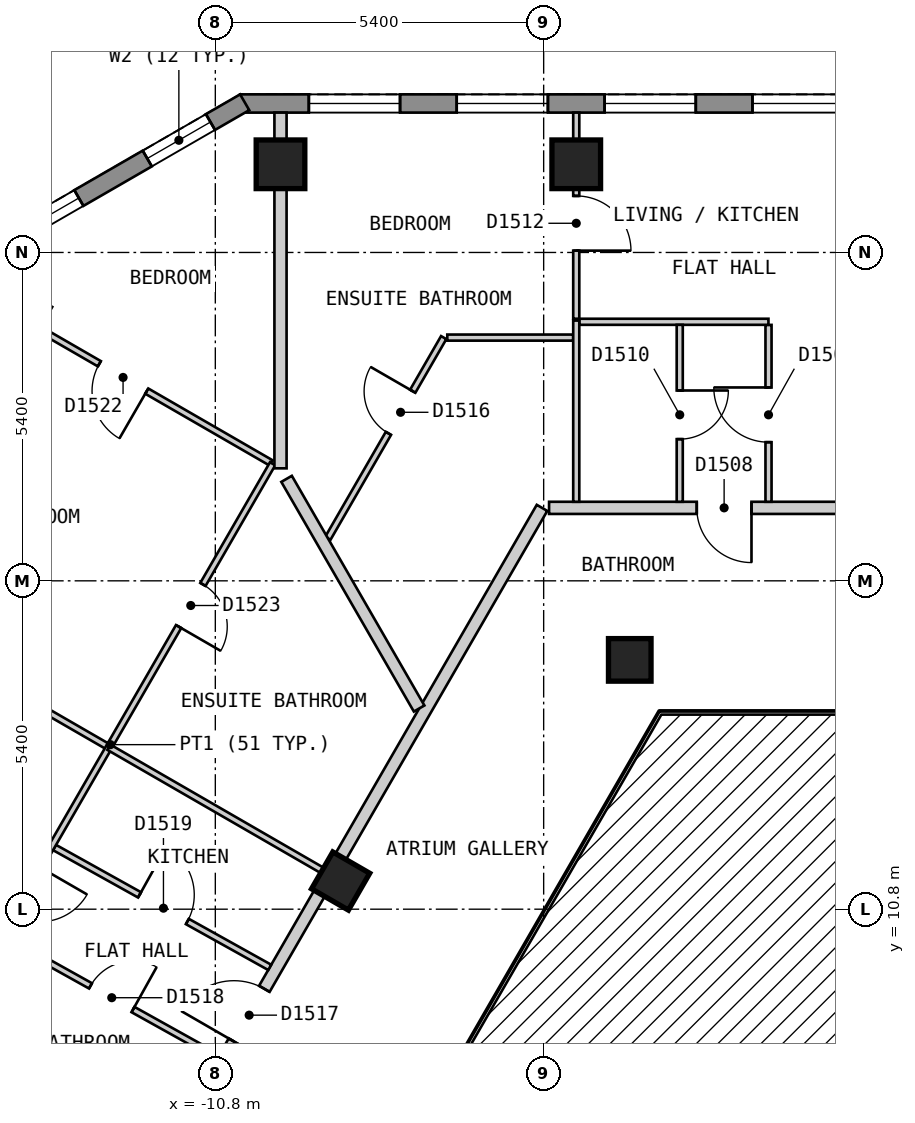
"""IFC4 building model, lengths in metres.
Left out: names, types, materials, properties, quantities, classifications, styles, units other than length and angle.
Written with IfcOpenShell. Run it as: python <this file> out.ifc"""

import sys

from ifc_helpers import new_model, si_unit, direction, frame, frame_2d, origin, origin_2d, place, context, subcontext, project, spatial, polyline, rectangle, outline, extrude, element, fill, save


model = new_model("IFC4")
c1 = context("Model", 3, precision=1e-05, world=origin(), true_north=direction((0.0, 1.0)))
c2 = subcontext(c1, "Body", "Model", "MODEL_VIEW")
j1 = project(units=[si_unit("LENGTHUNIT", "METRE"), si_unit("PLANEANGLEUNIT", "RADIAN")], contexts=[c1])
p1 = place(None, origin())
s1 = spatial("IfcSite", under=j1, at=p1, CompositionType="ELEMENT")
p2 = place(p1, origin())
s2 = spatial("IfcBuilding", under=s1, at=p2, CompositionType="ELEMENT")
p3 = place(p2, frame((0.0, 0.0, 184.2)))
s3 = spatial("IfcBuildingStorey", under=s2, at=p3, CompositionType="ELEMENT", Elevation=184.2)
for number, where, z_axis, x_axis in (
    (1, (-4.864, 23.05, 0.0), (0.0, 0.0, 1.0), (-1.0, 0.0, 0.0)),
    (2, (-9.728, 23.05, 0.0), (0.0, 0.0, 1.0), (-1.0, 0.0, 0.0)),
):
    element("IfcColumn", number, at=place(p3, frame(where, z_axis=z_axis, x_axis=x_axis)), inside=s3, PredefinedType="COLUMN", context=c2, shape_type="SweptSolid", body=[
        extrude(rectangle(XDim=0.8, YDim=0.8, at=origin_2d()), origin(), (0.0, 0.0, 1.0), 3.0),
    ])
for number, where, z_axis, x_axis in (
    (3, (-3.984, 14.9, 0.0), (0.0, 0.0, 1.0), (1.0, 0.0, 0.0)),
    (4, (-8.739, 11.263, 0.0), (0.0, 0.0, 1.0), (-0.5, -0.866, 0.0)),
):
    element("IfcColumn", number, at=place(p3, frame(where, z_axis=z_axis, x_axis=x_axis)), inside=s3, PredefinedType="COLUMN", context=c2, shape_type="SweptSolid", body=[
        extrude(rectangle(XDim=0.7, YDim=0.7, at=origin_2d()), origin(), (0.0, 0.0, 1.0), 3.0),
    ])
p4 = place(p3, frame((10.392, 24.05, 0.0), z_axis=(0.0, 0.0, 1.0), x_axis=(-1.0, 0.0, 0.0)))
e5 = element("IfcWall", 5, at=p4, inside=s3, PredefinedType="SOLIDWALL", context=c2, shape_type="SweptSolid", body=[
    extrude(outline(polyline([(0.0, -0.15), (20.784, -0.15), (20.704, 0.15), (0.08, 0.15), (0.0, -0.15)])), origin(), (0.0, 0.0, 1.0), 2.7),
])
p5 = place(p4, frame((1.13, 0.0, 0.15)))
e6 = element("IfcOpeningElement", 6, at=p5, cuts=e5, PredefinedType="OPENING", context=c2, shape_type="SweptSolid", body=[
    extrude(rectangle(XDim=1.5, YDim=2.1, at=frame_2d((0.75, 1.05))), frame((0.0, 0.16, 0.0), z_axis=(0.0, -1.0, 0.0), x_axis=(1.0, 0.0, 0.0)), (0.0, 0.0, 1.0), 0.32),
])
p6 = place(p4, frame((3.562, 0.0, 0.15)))
e7 = element("IfcOpeningElement", 7, at=p6, cuts=e5, PredefinedType="OPENING", context=c2, shape_type="SweptSolid", body=[
    extrude(rectangle(XDim=1.5, YDim=2.1, at=frame_2d((0.75, 1.05))), frame((0.0, 0.16, 0.0), z_axis=(0.0, -1.0, 0.0), x_axis=(1.0, 0.0, 0.0)), (0.0, 0.0, 1.0), 0.32),
])
p7 = place(p4, frame((5.994, 0.0, 0.15)))
e8 = element("IfcOpeningElement", 8, at=p7, cuts=e5, PredefinedType="OPENING", context=c2, shape_type="SweptSolid", body=[
    extrude(rectangle(XDim=1.5, YDim=2.1, at=frame_2d((0.75, 1.05))), frame((0.0, 0.16, 0.0), z_axis=(0.0, -1.0, 0.0), x_axis=(1.0, 0.0, 0.0)), (0.0, 0.0, 1.0), 0.32),
])
p8 = place(p4, frame((8.426, 0.0, 0.15)))
e9 = element("IfcOpeningElement", 9, at=p8, cuts=e5, PredefinedType="OPENING", context=c2, shape_type="SweptSolid", body=[
    extrude(rectangle(XDim=1.5, YDim=2.1, at=frame_2d((0.75, 1.05))), frame((0.0, 0.16, 0.0), z_axis=(0.0, -1.0, 0.0), x_axis=(1.0, 0.0, 0.0)), (0.0, 0.0, 1.0), 0.32),
])
p9 = place(p4, frame((10.858, 0.0, 0.15)))
e10 = element("IfcOpeningElement", 10, at=p9, cuts=e5, PredefinedType="OPENING", context=c2, shape_type="SweptSolid", body=[
    extrude(rectangle(XDim=1.5, YDim=2.1, at=frame_2d((0.75, 1.05))), frame((0.0, 0.16, 0.0), z_axis=(0.0, -1.0, 0.0), x_axis=(1.0, 0.0, 0.0)), (0.0, 0.0, 1.0), 0.32),
])
p10 = place(p4, frame((13.29, 0.0, 0.15)))
e11 = element("IfcOpeningElement", 11, at=p10, cuts=e5, PredefinedType="OPENING", context=c2, shape_type="SweptSolid", body=[
    extrude(rectangle(XDim=1.5, YDim=2.1, at=frame_2d((0.75, 1.05))), frame((0.0, 0.16, 0.0), z_axis=(0.0, -1.0, 0.0), x_axis=(1.0, 0.0, 0.0)), (0.0, 0.0, 1.0), 0.32),
])
p11 = place(p4, frame((15.722, 0.0, 0.15)))
e12 = element("IfcOpeningElement", 12, at=p11, cuts=e5, PredefinedType="OPENING", context=c2, shape_type="SweptSolid", body=[
    extrude(rectangle(XDim=1.5, YDim=2.1, at=frame_2d((0.75, 1.05))), frame((0.0, 0.16, 0.0), z_axis=(0.0, -1.0, 0.0), x_axis=(1.0, 0.0, 0.0)), (0.0, 0.0, 1.0), 0.32),
])
p12 = place(p4, frame((18.154, 0.0, 0.15)))
e13 = element("IfcOpeningElement", 13, at=p12, cuts=e5, PredefinedType="OPENING", context=c2, shape_type="SweptSolid", body=[
    extrude(rectangle(XDim=1.5, YDim=2.1, at=frame_2d((0.75, 1.05))), frame((0.0, 0.16, 0.0), z_axis=(0.0, -1.0, 0.0), x_axis=(1.0, 0.0, 0.0)), (0.0, 0.0, 1.0), 0.32),
])
p13 = place(p3, frame((-10.317, 24.07, 0.0), z_axis=(0.0, 0.0, 1.0), x_axis=(-0.866022959057, -0.500004234368, 0.0)))
e14 = element("IfcWall", 14, at=p13, inside=s3, PredefinedType="SOLIDWALL", context=c2, shape_type="SweptSolid", body=[
    extrude(outline(polyline([(0.0, -0.15), (5.0, -0.15), (4.92, 0.15), (0.08, 0.15), (0.0, -0.15)])), origin(), (0.0, 0.0, 1.0), 2.7),
])
p14 = place(p13, frame((0.65, 0.0, 0.15)))
e15 = element("IfcOpeningElement", 15, at=p14, cuts=e14, PredefinedType="OPENING", context=c2, shape_type="SweptSolid", body=[
    extrude(rectangle(XDim=1.2, YDim=2.1, at=frame_2d((0.6, 1.05))), frame((0.0, 0.16, 0.0), z_axis=(0.0, -1.0, 0.0), x_axis=(1.0, 0.0, 0.0)), (0.0, 0.0, 1.0), 0.32),
])
p15 = place(p13, frame((3.149, 0.0, 0.15)))
e16 = element("IfcOpeningElement", 16, at=p15, cuts=e14, PredefinedType="OPENING", context=c2, shape_type="SweptSolid", body=[
    extrude(rectangle(XDim=1.2, YDim=2.1, at=frame_2d((0.6, 1.05))), frame((0.0, 0.16, 0.0), z_axis=(0.0, -1.0, 0.0), x_axis=(1.0, 0.0, 0.0)), (0.0, 0.0, 1.0), 0.32),
])
p16 = place(p3, frame((-5.311, 17.4, 0.0), z_axis=(0.0, 0.0, 1.0), x_axis=(1.0, 0.0, 0.0)))
e17 = element("IfcWall", 17, at=p16, inside=s3, PredefinedType="PARTITIONING", context=c2, shape_type="SweptSolid", body=[
    extrude(rectangle(XDim=10.737, YDim=0.2, at=frame_2d((5.369, 0.0))), origin(), (0.0, 0.0, 1.0), 2.7),
])
p17 = place(p16, frame((2.429, 0.0, 0.0)))
e18 = element("IfcOpeningElement", 18, at=p17, cuts=e17, PredefinedType="OPENING", context=c2, shape_type="SweptSolid", body=[
    extrude(rectangle(XDim=0.9, YDim=2.1, at=frame_2d((0.45, 1.05))), frame((0.0, 0.11, 0.0), z_axis=(0.0, -1.0, 0.0), x_axis=(1.0, 0.0, 0.0)), (0.0, 0.0, 1.0), 0.22),
])
p18 = place(p3, frame((-10.854, 8.0, 0.0), z_axis=(0.0, 0.0, 1.0), x_axis=(0.499997637144, 0.866026767976, 0.0)))
e19 = element("IfcWall", 19, at=p18, inside=s3, PredefinedType="PARTITIONING", context=c2, shape_type="SweptSolid", body=[
    extrude(rectangle(XDim=10.854, YDim=0.2, at=frame_2d((5.427, 0.0))), origin(), (0.0, 0.0, 1.0), 2.7),
])
p19 = place(p18, frame((0.721, 0.0, 0.0)))
e20 = element("IfcOpeningElement", 20, at=p19, cuts=e19, PredefinedType="OPENING", context=c2, shape_type="SweptSolid", body=[
    extrude(rectangle(XDim=1.0, YDim=2.1, at=frame_2d((0.5, 1.05))), frame((0.0, 0.11, 0.0), z_axis=(0.0, -1.0, 0.0), x_axis=(1.0, 0.0, 0.0)), (0.0, 0.0, 1.0), 0.22),
])
p20 = place(p3, frame((-4.864, 23.9, 0.0), z_axis=(0.0, 0.0, 1.0), x_axis=(0.0, -1.0, 0.0)))
e21 = element("IfcWall", 21, at=p20, inside=s3, PredefinedType="PARTITIONING", context=c2, shape_type="SweptSolid", body=[
    extrude(rectangle(XDim=3.39, YDim=0.1, at=frame_2d((1.695, 0.0))), origin(), (0.0, 0.0, 1.0), 2.7),
])
p21 = place(p20, frame((1.37, 0.0, 0.0)))
e22 = element("IfcOpeningElement", 22, at=p21, cuts=e21, PredefinedType="OPENING", context=c2, shape_type="SweptSolid", body=[
    extrude(rectangle(XDim=0.9, YDim=2.1, at=frame_2d((0.45, 1.05))), frame((0.0, 0.06, 0.0), z_axis=(0.0, -1.0, 0.0), x_axis=(1.0, 0.0, 0.0)), (0.0, 0.0, 1.0), 0.12),
])
p22 = place(p3, frame((-1.702, 20.409, 0.0), z_axis=(0.0, 0.0, 1.0), x_axis=(0.0, -1.0, 0.0)))
e23 = element("IfcWall", 23, at=p22, inside=s3, PredefinedType="PARTITIONING", context=c2, shape_type="SweptSolid", body=[
    extrude(rectangle(XDim=2.909, YDim=0.1, at=frame_2d((1.455, 0.0))), origin(), (0.0, 0.0, 1.0), 2.7),
])
p23 = place(p22, frame((1.029, 0.0, 0.0)))
e24 = element("IfcOpeningElement", 24, at=p23, cuts=e23, PredefinedType="OPENING", context=c2, shape_type="SweptSolid", body=[
    extrude(rectangle(XDim=0.9, YDim=2.1, at=frame_2d((0.45, 1.05))), frame((0.0, 0.06, 0.0), z_axis=(0.0, -1.0, 0.0), x_axis=(1.0, 0.0, 0.0)), (0.0, 0.0, 1.0), 0.12),
])
p24 = place(p3, frame((-13.444, 11.814, 0.0), z_axis=(0.0, 0.0, 1.0), x_axis=(0.873653620945, -0.486548405207, 0.0)))
e25 = element("IfcWall", 25, at=p24, inside=s3, PredefinedType="PARTITIONING", context=c2, shape_type="SweptSolid", body=[
    extrude(rectangle(XDim=4.051, YDim=0.1, at=frame_2d((2.025, 0.0))), origin(), (0.0, 0.0, 1.0), 2.7),
])
p25 = place(p24, frame((1.6, 0.0, 0.0)))
e26 = element("IfcOpeningElement", 26, at=p25, cuts=e25, PredefinedType="OPENING", context=c2, shape_type="SweptSolid", body=[
    extrude(rectangle(XDim=0.9, YDim=2.1, at=frame_2d((0.45, 1.05))), frame((0.0, 0.06, 0.0), z_axis=(0.0, -1.0, 0.0), x_axis=(1.0, 0.0, 0.0)), (0.0, 0.0, 1.0), 0.12),
])
p26 = place(p3, frame((-14.294, 10.342, 0.0), z_axis=(0.0, 0.0, 1.0), x_axis=(0.873582256032, -0.486676527013, 0.0)))
e27 = element("IfcWall", 27, at=p26, inside=s3, PredefinedType="PARTITIONING", context=c2, shape_type="SweptSolid", body=[
    extrude(rectangle(XDim=4.05, YDim=0.1, at=frame_2d((2.025, 0.0))), origin(), (0.0, 0.0, 1.0), 2.7),
])
p27 = place(p26, frame((1.65, 0.0, 0.0)))
e28 = element("IfcOpeningElement", 28, at=p27, cuts=e27, PredefinedType="OPENING", context=c2, shape_type="SweptSolid", body=[
    extrude(rectangle(XDim=0.8, YDim=2.1, at=frame_2d((0.4, 1.05))), frame((0.0, 0.06, 0.0), z_axis=(0.0, -1.0, 0.0), x_axis=(1.0, 0.0, 0.0)), (0.0, 0.0, 1.0), 0.12),
])
p28 = place(p3, frame((-17.486, 16.313, 0.0), z_axis=(0.0, 0.0, 1.0), x_axis=(0.866004402611, -0.500036373335, 0.0)))
e29 = element("IfcWall", 29, at=p28, inside=s3, PredefinedType="PARTITIONING", context=c2, shape_type="SweptSolid", body=[
    extrude(rectangle(XDim=5.7, YDim=0.1, at=frame_2d((2.85, 0.0))), origin(), (0.0, 0.0, 1.0), 2.7),
])
p29 = place(p28, frame((2.4, 0.0, 0.0)))
e30 = element("IfcOpeningElement", 30, at=p29, cuts=e29, PredefinedType="OPENING", context=c2, shape_type="SweptSolid", body=[
    extrude(rectangle(XDim=0.9, YDim=2.1, at=frame_2d((0.45, 1.05))), frame((0.0, 0.06, 0.0), z_axis=(0.0, -1.0, 0.0), x_axis=(1.0, 0.0, 0.0)), (0.0, 0.0, 1.0), 0.12),
])
p30 = place(p3, frame((-14.794, 20.975, 0.0), z_axis=(0.0, 0.0, 1.0), x_axis=(0.865989811779, -0.500061642096, 0.0)))
e31 = element("IfcWall", 31, at=p30, inside=s3, PredefinedType="PARTITIONING", context=c2, shape_type="SweptSolid", body=[
    extrude(rectangle(XDim=5.67, YDim=0.1, at=frame_2d((2.835, 0.0))), origin(), (0.0, 0.0, 1.0), 2.7),
])
p31 = place(p30, frame((2.41, 0.0, 0.0)))
e32 = element("IfcOpeningElement", 32, at=p31, cuts=e31, PredefinedType="OPENING", context=c2, shape_type="SweptSolid", body=[
    extrude(rectangle(XDim=0.9, YDim=2.1, at=frame_2d((0.45, 1.05))), frame((0.0, 0.06, 0.0), z_axis=(0.0, -1.0, 0.0), x_axis=(1.0, 0.0, 0.0)), (0.0, 0.0, 1.0), 0.12),
])
p32 = place(p3, frame((-6.985, 20.2, 0.0), z_axis=(0.0, 0.0, 1.0), x_axis=(1.0, 0.0, 0.0)))
e33 = element("IfcWall", 33, at=p32, inside=s3, PredefinedType="PARTITIONING", context=c2, shape_type="SweptSolid", body=[
    extrude(rectangle(XDim=2.071, YDim=0.1, at=frame_2d((1.036, 0.0))), origin(), (0.0, 0.0, 1.0), 2.7),
])
p33 = place(p3, frame((-4.814, 20.46, 0.0), z_axis=(0.0, 0.0, 1.0), x_axis=(1.0, 0.0, 0.0)))
e34 = element("IfcWall", 34, at=p33, inside=s3, PredefinedType="PARTITIONING", context=c2, shape_type="SweptSolid", body=[
    extrude(rectangle(XDim=3.111, YDim=0.1, at=frame_2d((1.556, 0.0))), origin(), (0.0, 0.0, 1.0), 2.7),
])
p34 = place(p3, frame((-8.949, 16.9, 0.0), z_axis=(0.0, 0.0, 1.0), x_axis=(0.499949850951, 0.866054355415, 0.0)))
e35 = element("IfcWall", 35, at=p34, inside=s3, PredefinedType="PARTITIONING", context=c2, shape_type="SweptSolid", body=[
    extrude(rectangle(XDim=3.811, YDim=0.1, at=frame_2d((1.905, 0.0))), origin(), (0.0, 0.0, 1.0), 2.7),
])
p35 = place(p34, frame((1.992, 0.0, 0.0)))
e36 = element("IfcOpeningElement", 36, at=p35, cuts=e35, PredefinedType="OPENING", context=c2, shape_type="SweptSolid", body=[
    extrude(rectangle(XDim=0.8, YDim=2.1, at=frame_2d((0.4, 1.05))), frame((0.0, 0.06, 0.0), z_axis=(0.0, -1.0, 0.0), x_axis=(1.0, 0.0, 0.0)), (0.0, 0.0, 1.0), 0.12),
])
p36 = place(p3, frame((-15.192, 8.887, 0.0), z_axis=(0.0, 0.0, 1.0), x_axis=(0.500028204665, 0.866009119201, 0.0)))
e37 = element("IfcWall", 37, at=p36, inside=s3, PredefinedType="PARTITIONING", context=c2, shape_type="SweptSolid", body=[
    extrude(rectangle(XDim=10.667, YDim=0.1, at=frame_2d((5.334, 0.0))), origin(), (0.0, 0.0, 1.0), 2.7),
])
p37 = place(p36, frame((2.108, 0.0, 0.0)))
e38 = element("IfcOpeningElement", 38, at=p37, cuts=e37, PredefinedType="OPENING", context=c2, shape_type="SweptSolid", body=[
    extrude(rectangle(XDim=0.9, YDim=2.1, at=frame_2d((0.45, 1.05))), frame((0.0, 0.06, 0.0), z_axis=(0.0, -1.0, 0.0), x_axis=(1.0, 0.0, 0.0)), (0.0, 0.0, 1.0), 0.12),
])
p38 = place(p36, frame((7.576, 0.0, 0.0)))
e39 = element("IfcOpeningElement", 39, at=p38, cuts=e37, PredefinedType="OPENING", context=c2, shape_type="SweptSolid", body=[
    extrude(rectangle(XDim=0.8, YDim=2.1, at=frame_2d((0.4, 1.05))), frame((0.0, 0.06, 0.0), z_axis=(0.0, -1.0, 0.0), x_axis=(1.0, 0.0, 0.0)), (0.0, 0.0, 1.0), 0.12),
])
p39 = place(p3, frame((-3.162, 17.5, 0.0), z_axis=(0.0, 0.0, 1.0), x_axis=(0.0, 1.0, 0.0)))
e40 = element("IfcWall", 40, at=p39, inside=s3, PredefinedType="PARTITIONING", context=c2, shape_type="SweptSolid", body=[
    extrude(rectangle(XDim=2.91, YDim=0.1, at=frame_2d((1.455, 0.0))), origin(), (0.0, 0.0, 1.0), 2.7),
])
p40 = place(p39, frame((1.03, 0.0, 0.0)))
e41 = element("IfcOpeningElement", 41, at=p40, cuts=e40, PredefinedType="OPENING", context=c2, shape_type="SweptSolid", body=[
    extrude(rectangle(XDim=0.8, YDim=2.1, at=frame_2d((0.4, 1.05))), frame((0.0, 0.06, 0.0), z_axis=(0.0, -1.0, 0.0), x_axis=(1.0, 0.0, 0.0)), (0.0, 0.0, 1.0), 0.12),
])
p41 = place(p3, frame((-4.864, 17.5, 0.0), z_axis=(0.0, 0.0, 1.0), x_axis=(0.0, 1.0, 0.0)))
e42 = element("IfcWall", 42, at=p41, inside=s3, PredefinedType="PARTITIONING", context=c2, shape_type="SweptSolid", body=[
    extrude(rectangle(XDim=2.98, YDim=0.1, at=frame_2d((1.49, 0.0))), origin(), (0.0, 0.0, 1.0), 2.7),
])
p42 = place(p3, frame((-9.628, 17.877, 0.0), z_axis=(0.0, 0.0, 1.0), x_axis=(0.499890461358, -0.866088636713, 0.0)))
e43 = element("IfcWall", 43, at=p42, inside=s3, PredefinedType="PARTITIONING", context=c2, shape_type="SweptSolid", body=[
    extrude(rectangle(XDim=4.361, YDim=0.2, at=frame_2d((2.18, 0.0))), origin(), (0.0, 0.0, 1.0), 2.7),
])
p43 = place(p3, frame((-15.127, 8.734, 0.0), z_axis=(0.0, 0.0, 1.0), x_axis=(0.865984601828, -0.500070664403, 0.0)))
e44 = element("IfcWall", 44, at=p43, inside=s3, PredefinedType="PARTITIONING", context=c2, shape_type="SweptSolid", body=[
    extrude(rectangle(XDim=4.167, YDim=0.2, at=frame_2d((2.084, 0.0))), origin(), (0.0, 0.0, 1.0), 2.7),
])
p44 = place(p3, frame((-9.728, 18.05, 0.0), z_axis=(0.0, 0.0, 1.0), x_axis=(0.0, 1.0, 0.0)))
e45 = element("IfcWall", 45, at=p44, inside=s3, PredefinedType="PARTITIONING", context=c2, shape_type="SweptSolid", body=[
    extrude(rectangle(XDim=5.85, YDim=0.2, at=frame_2d((2.925, 0.0))), origin(), (0.0, 0.0, 1.0), 2.7),
])
p45 = place(p3, frame((-12.55, 13.463, 0.0), z_axis=(0.0, 0.0, 1.0), x_axis=(0.86606561423, -0.499930346997, 0.0)))
e46 = element("IfcWall", 46, at=p45, inside=s3, PredefinedType="PARTITIONING", context=c2, shape_type="SweptSolid", body=[
    extrude(rectangle(XDim=4.1, YDim=0.1, at=frame_2d((2.05, 0.0))), origin(), (0.0, 0.0, 1.0), 2.7),
])
p46 = place(p9, origin())
e47 = element("IfcWindow", 47, at=p46, inside=s3, PartitioningType="SINGLE_PANEL", PredefinedType="WINDOW", context=c2, shape_type="SweptSolid", body=[
    extrude(rectangle(XDim=1.5, YDim=2.1, at=frame_2d((0.75, 1.05))), frame((0.0, 0.03, 0.0), z_axis=(0.0, -1.0, 0.0), x_axis=(1.0, 0.0, 0.0)), (0.0, 0.0, 1.0), 0.06),
])
fill(e10, e47)
p47 = place(p10, origin())
e48 = element("IfcWindow", 48, at=p47, inside=s3, PartitioningType="SINGLE_PANEL", PredefinedType="WINDOW", context=c2, shape_type="SweptSolid", body=[
    extrude(rectangle(XDim=1.5, YDim=2.1, at=frame_2d((0.75, 1.05))), frame((0.0, 0.03, 0.0), z_axis=(0.0, -1.0, 0.0), x_axis=(1.0, 0.0, 0.0)), (0.0, 0.0, 1.0), 0.06),
])
fill(e11, e48)
p48 = place(p11, origin())
e49 = element("IfcWindow", 49, at=p48, inside=s3, PartitioningType="SINGLE_PANEL", PredefinedType="WINDOW", context=c2, shape_type="SweptSolid", body=[
    extrude(rectangle(XDim=1.5, YDim=2.1, at=frame_2d((0.75, 1.05))), frame((0.0, 0.03, 0.0), z_axis=(0.0, -1.0, 0.0), x_axis=(1.0, 0.0, 0.0)), (0.0, 0.0, 1.0), 0.06),
])
fill(e12, e49)
p49 = place(p12, origin())
e50 = element("IfcWindow", 50, at=p49, inside=s3, PartitioningType="SINGLE_PANEL", PredefinedType="WINDOW", context=c2, shape_type="SweptSolid", body=[
    extrude(rectangle(XDim=1.5, YDim=2.1, at=frame_2d((0.75, 1.05))), frame((0.0, 0.03, 0.0), z_axis=(0.0, -1.0, 0.0), x_axis=(1.0, 0.0, 0.0)), (0.0, 0.0, 1.0), 0.06),
])
fill(e13, e50)
p50 = place(p14, origin())
e51 = element("IfcWindow", 51, at=p50, inside=s3, PartitioningType="SINGLE_PANEL", PredefinedType="WINDOW", context=c2, shape_type="SweptSolid", body=[
    extrude(rectangle(XDim=1.2, YDim=2.1, at=frame_2d((0.6, 1.05))), frame((0.0, 0.03, 0.0), z_axis=(0.0, -1.0, 0.0), x_axis=(1.0, 0.0, 0.0)), (0.0, 0.0, 1.0), 0.06),
])
fill(e15, e51)
p51 = place(p15, origin())
e52 = element("IfcWindow", 52, at=p51, inside=s3, PartitioningType="SINGLE_PANEL", PredefinedType="WINDOW", context=c2, shape_type="SweptSolid", body=[
    extrude(rectangle(XDim=1.2, YDim=2.1, at=frame_2d((0.6, 1.05))), frame((0.0, 0.03, 0.0), z_axis=(0.0, -1.0, 0.0), x_axis=(1.0, 0.0, 0.0)), (0.0, 0.0, 1.0), 0.06),
])
fill(e16, e52)
p52 = place(p17, origin())
e53 = element("IfcDoor", 53, at=p52, inside=s3, OperationType="SINGLE_SWING_RIGHT", PredefinedType="DOOR", context=c2, shape_type="SweptSolid", body=[
    extrude(rectangle(XDim=0.9, YDim=2.1, at=frame_2d((0.45, 1.05))), frame((0.0, 0.025, 0.0), z_axis=(0.0, -1.0, 0.0), x_axis=(1.0, 0.0, 0.0)), (0.0, 0.0, 1.0), 0.05),
])
fill(e18, e53)
p53 = place(p23, origin())
e54 = element("IfcDoor", 54, at=p53, inside=s3, OperationType="SINGLE_SWING_LEFT", PredefinedType="DOOR", context=c2, shape_type="SweptSolid", body=[
    extrude(rectangle(XDim=0.9, YDim=2.1, at=frame_2d((0.45, 1.05))), frame((0.0, 0.025, 0.0), z_axis=(0.0, -1.0, 0.0), x_axis=(1.0, 0.0, 0.0)), (0.0, 0.0, 1.0), 0.05),
])
fill(e24, e54)
p54 = place(p40, origin())
e55 = element("IfcDoor", 55, at=p54, inside=s3, OperationType="SINGLE_SWING_RIGHT", PredefinedType="DOOR", context=c2, shape_type="SweptSolid", body=[
    extrude(rectangle(XDim=0.8, YDim=2.1, at=frame_2d((0.4, 1.05))), frame((0.0, 0.025, 0.0), z_axis=(0.0, -1.0, 0.0), x_axis=(1.0, 0.0, 0.0)), (0.0, 0.0, 1.0), 0.05),
])
fill(e41, e55)
p55 = place(p21, origin())
e56 = element("IfcDoor", 56, at=p55, inside=s3, OperationType="SINGLE_SWING_RIGHT", PredefinedType="DOOR", context=c2, shape_type="SweptSolid", body=[
    extrude(rectangle(XDim=0.9, YDim=2.1, at=frame_2d((0.45, 1.05))), frame((0.0, 0.025, 0.0), z_axis=(0.0, -1.0, 0.0), x_axis=(1.0, 0.0, 0.0)), (0.0, 0.0, 1.0), 0.05),
])
fill(e22, e56)
p56 = place(p35, origin())
e57 = element("IfcDoor", 57, at=p56, inside=s3, OperationType="SINGLE_SWING_RIGHT", PredefinedType="DOOR", context=c2, shape_type="SweptSolid", body=[
    extrude(rectangle(XDim=0.8, YDim=2.1, at=frame_2d((0.4, 1.05))), frame((0.0, 0.025, 0.0), z_axis=(0.0, -1.0, 0.0), x_axis=(1.0, 0.0, 0.0)), (0.0, 0.0, 1.0), 0.05),
])
fill(e36, e57)
p57 = place(p19, origin())
e58 = element("IfcDoor", 58, at=p57, inside=s3, OperationType="SINGLE_SWING_LEFT", PredefinedType="DOOR", context=c2, shape_type="SweptSolid", body=[
    extrude(rectangle(XDim=1.0, YDim=2.1, at=frame_2d((0.5, 1.05))), frame((0.0, 0.025, 0.0), z_axis=(0.0, -1.0, 0.0), x_axis=(1.0, 0.0, 0.0)), (0.0, 0.0, 1.0), 0.05),
])
fill(e20, e58)
p58 = place(p27, origin())
e59 = element("IfcDoor", 59, at=p58, inside=s3, OperationType="SINGLE_SWING_RIGHT", PredefinedType="DOOR", context=c2, shape_type="SweptSolid", body=[
    extrude(rectangle(XDim=0.8, YDim=2.1, at=frame_2d((0.4, 1.05))), frame((0.0, 0.025, 0.0), z_axis=(0.0, -1.0, 0.0), x_axis=(1.0, 0.0, 0.0)), (0.0, 0.0, 1.0), 0.05),
])
fill(e28, e59)
p59 = place(p25, origin())
e60 = element("IfcDoor", 60, at=p59, inside=s3, OperationType="SINGLE_SWING_LEFT", PredefinedType="DOOR", context=c2, shape_type="SweptSolid", body=[
    extrude(rectangle(XDim=0.9, YDim=2.1, at=frame_2d((0.45, 1.05))), frame((0.0, 0.025, 0.0), z_axis=(0.0, -1.0, 0.0), x_axis=(1.0, 0.0, 0.0)), (0.0, 0.0, 1.0), 0.05),
])
fill(e26, e60)
p60 = place(p31, origin())
e61 = element("IfcDoor", 61, at=p60, inside=s3, OperationType="SINGLE_SWING_RIGHT", PredefinedType="DOOR", context=c2, shape_type="SweptSolid", body=[
    extrude(rectangle(XDim=0.9, YDim=2.1, at=frame_2d((0.45, 1.05))), frame((0.0, 0.025, 0.0), z_axis=(0.0, -1.0, 0.0), x_axis=(1.0, 0.0, 0.0)), (0.0, 0.0, 1.0), 0.05),
])
fill(e32, e61)
p61 = place(p38, origin())
e62 = element("IfcDoor", 62, at=p61, inside=s3, OperationType="SINGLE_SWING_LEFT", PredefinedType="DOOR", context=c2, shape_type="SweptSolid", body=[
    extrude(rectangle(XDim=0.8, YDim=2.1, at=frame_2d((0.4, 1.05))), frame((0.0, 0.025, 0.0), z_axis=(0.0, -1.0, 0.0), x_axis=(1.0, 0.0, 0.0)), (0.0, 0.0, 1.0), 0.05),
])
fill(e39, e62)
save(model, sys.argv[1])
